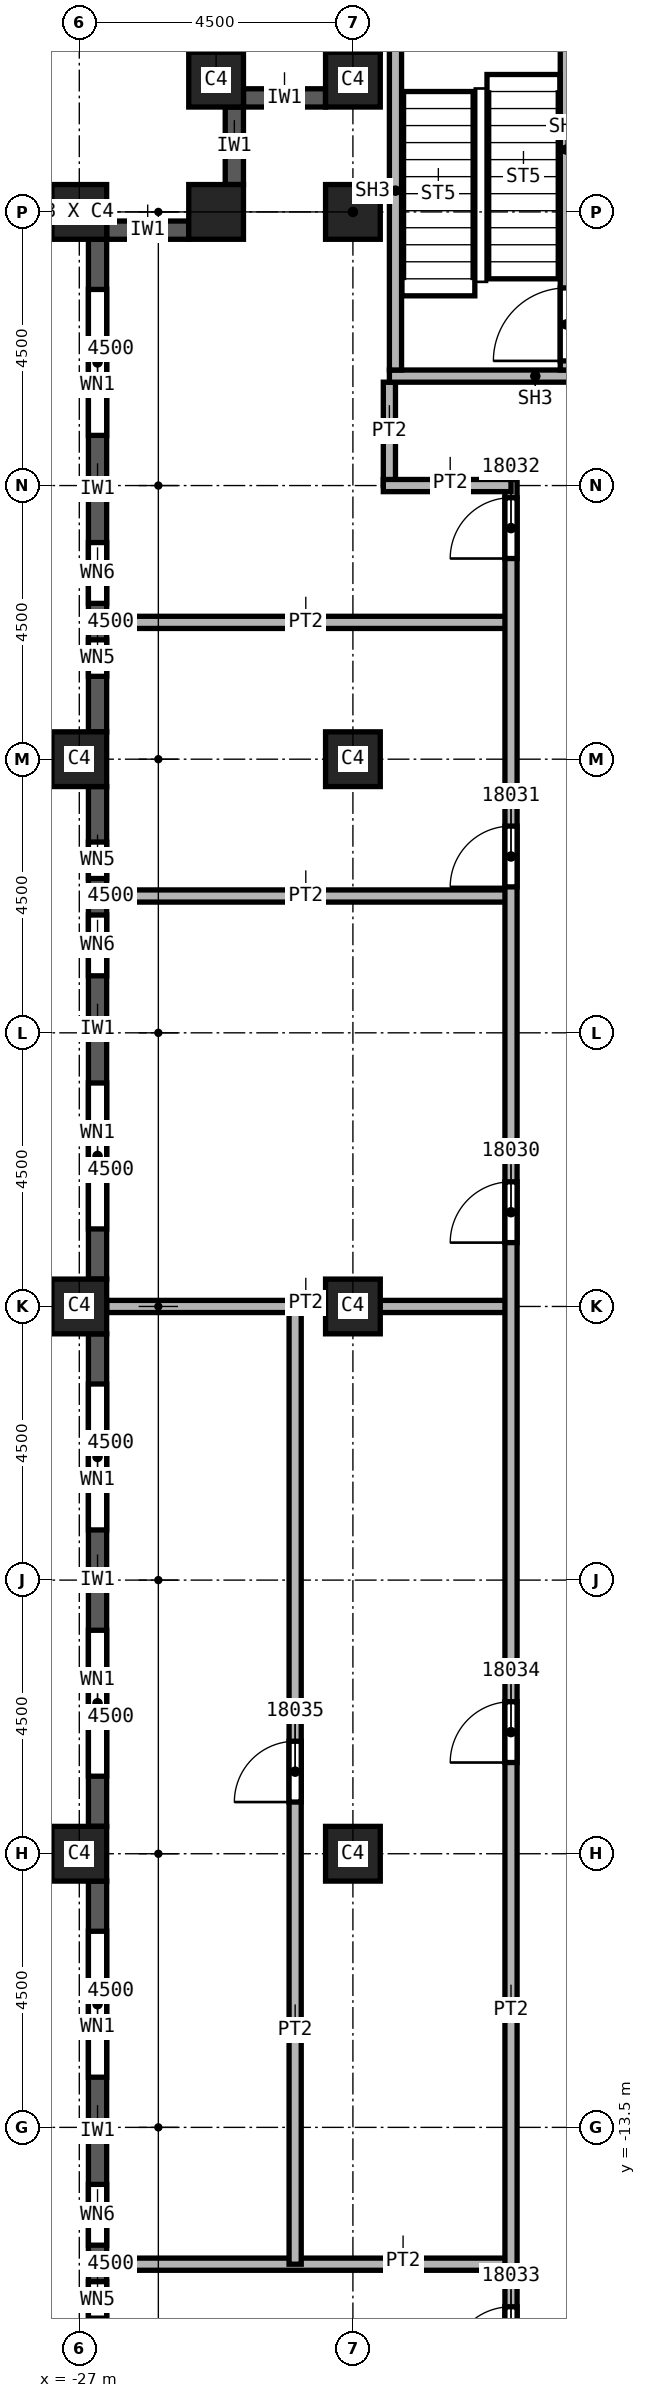
"""IFC4 building model, lengths in metres.
Left out: names, types, materials, properties, quantities, classifications, styles, units other than length and angle.
Written with IfcOpenShell. Run it as: python <this file> out.ifc"""

import sys

from ifc_helpers import new_model, si_unit, direction, frame, frame_2d, origin, origin_2d, place, context, subcontext, project, spatial, rectangle, extrude, element, fill, save


model = new_model("IFC4")
c1 = context("Model", 3, precision=1e-05, world=origin(), true_north=direction((0.0, 1.0)))
c2 = subcontext(c1, "Body", "Model", "MODEL_VIEW")
j1 = project(units=[si_unit("LENGTHUNIT", "METRE"), si_unit("PLANEANGLEUNIT", "RADIAN")], contexts=[c1])
p1 = place(None, origin())
s1 = spatial("IfcSite", under=j1, at=p1, CompositionType="ELEMENT")
p2 = place(p1, origin())
s2 = spatial("IfcBuilding", under=s1, at=p2, CompositionType="ELEMENT")
p3 = place(p2, frame((0.0, 0.0, 266.0)))
s3 = spatial("IfcBuildingStorey", under=s2, at=p3, CompositionType="ELEMENT", Elevation=266.0)
for number, where, z_axis, x_axis in (
    (1, (-22.5, 0.0, 0.0), (0.0, 0.0, 1.0), (1.0, 0.0, 0.0)),
    (2, (-22.5, 9.0, 0.0), (0.0, 0.0, 1.0), (1.0, 0.0, 0.0)),
    (3, (-22.5, 18.0, 0.0), (0.0, 0.0, 1.0), (1.0, 0.0, 0.0)),
    (4, (-22.5, -9.0, 0.0), (0.0, 0.0, 1.0), (1.0, 0.0, 0.0)),
    (5, (-27.0, 0.0, 0.0), (0.0, 0.0, 1.0), (0.0, 1.0, 0.0)),
    (6, (-27.0, 9.0, 0.0), (0.0, 0.0, 1.0), (0.0, 1.0, 0.0)),
    (7, (-27.0, 18.0, 0.0), (0.0, 0.0, 1.0), (0.0, 1.0, 0.0)),
    (8, (-27.0, -9.0, 0.0), (0.0, 0.0, 1.0), (0.0, 1.0, 0.0)),
    (9, (-22.5, 20.175, 0.0), (0.0, 0.0, 1.0), (1.0, 0.0, 0.0)),
    (10, (-24.75, 20.175, 0.0), (0.0, 0.0, 1.0), (1.0, 0.0, 0.0)),
    (11, (-24.75, 18.0, 0.0), (0.0, 0.0, 1.0), (1.0, 0.0, 0.0)),
):
    element("IfcColumn", number, at=place(p3, frame(where, z_axis=z_axis, x_axis=x_axis)), inside=s3, PredefinedType="COLUMN", context=c2, shape_type="SweptSolid", body=[
        extrude(rectangle(XDim=0.9, YDim=0.9, at=origin_2d()), origin(), (0.0, 0.0, 1.0), 3.72),
    ])
p4 = place(p3, frame((-24.45, 19.725, 0.0), z_axis=(0.0, 0.0, 1.0), x_axis=(0.0, -1.0, 0.0)))
e12 = element("IfcWall", 12, at=p4, inside=s3, PredefinedType="SOLIDWALL", context=c2, shape_type="SweptSolid", body=[
    extrude(rectangle(XDim=1.275, YDim=0.3, at=frame_2d((0.638, 0.0))), origin(), (0.0, 0.0, 1.0), 3.12),
])
p5 = place(p3, frame((-25.2, 17.7, 0.0), z_axis=(0.0, 0.0, 1.0), x_axis=(-1.0, 0.0, 0.0)))
e13 = element("IfcWall", 13, at=p5, inside=s3, PredefinedType="SOLIDWALL", context=c2, shape_type="SweptSolid", body=[
    extrude(rectangle(XDim=1.35, YDim=0.3, at=frame_2d((0.675, 0.0))), origin(), (0.0, 0.0, 1.0), 3.12),
])
p6 = place(p3, frame((-26.7, 17.55, 0.0), z_axis=(0.0, 0.0, 1.0), x_axis=(0.0, -1.0, 0.0)))
e14 = element("IfcWall", 14, at=p6, inside=s3, PredefinedType="SOLIDWALL", context=c2, shape_type="SweptSolid", body=[
    extrude(rectangle(XDim=8.1, YDim=0.3, at=frame_2d((4.05, 0.0))), origin(), (0.0, 0.0, 1.0), 3.12),
])
p7 = place(p6, frame((0.825, 0.0, 0.8)))
e15 = element("IfcOpeningElement", 15, at=p7, cuts=e14, PredefinedType="OPENING", context=c2, shape_type="SweptSolid", body=[
    extrude(rectangle(XDim=2.4, YDim=1.95, at=frame_2d((1.2, 0.975))), frame((0.0, 0.15, 0.0), z_axis=(0.0, -1.0, 0.0), x_axis=(1.0, 0.0, 0.0)), (0.0, 0.0, 1.0), 0.3),
])
p8 = place(p6, frame((4.988, 0.0, 0.8)))
e16 = element("IfcOpeningElement", 16, at=p8, cuts=e14, PredefinedType="OPENING", context=c2, shape_type="SweptSolid", body=[
    extrude(rectangle(XDim=1.0, YDim=1.95, at=frame_2d((0.5, 0.975))), frame((0.0, 0.15, 0.0), z_axis=(0.0, -1.0, 0.0), x_axis=(1.0, 0.0, 0.0)), (0.0, 0.0, 1.0), 0.3),
])
p9 = place(p6, frame((6.587, 0.0, 0.8)))
e17 = element("IfcOpeningElement", 17, at=p9, cuts=e14, PredefinedType="OPENING", context=c2, shape_type="SweptSolid", body=[
    extrude(rectangle(XDim=0.6, YDim=1.95, at=frame_2d((0.3, 0.975))), frame((0.0, 0.15, 0.0), z_axis=(0.0, -1.0, 0.0), x_axis=(1.0, 0.0, 0.0)), (0.0, 0.0, 1.0), 0.3),
])
p10 = place(p3, frame((-26.7, 8.55, 0.0), z_axis=(0.0, 0.0, 1.0), x_axis=(0.0, -1.0, 0.0)))
e18 = element("IfcWall", 18, at=p10, inside=s3, PredefinedType="SOLIDWALL", context=c2, shape_type="SweptSolid", body=[
    extrude(rectangle(XDim=8.1, YDim=0.3, at=frame_2d((4.05, 0.0))), origin(), (0.0, 0.0, 1.0), 3.12),
])
p11 = place(p10, frame((4.875, 0.0, 0.8)))
e19 = element("IfcOpeningElement", 19, at=p11, cuts=e18, PredefinedType="OPENING", context=c2, shape_type="SweptSolid", body=[
    extrude(rectangle(XDim=2.4, YDim=1.95, at=frame_2d((1.2, 0.975))), frame((0.0, 0.15, 0.0), z_axis=(0.0, -1.0, 0.0), x_axis=(1.0, 0.0, 0.0)), (0.0, 0.0, 1.0), 0.3),
])
p12 = place(p10, frame((0.913, 0.0, 0.8)))
e20 = element("IfcOpeningElement", 20, at=p12, cuts=e18, PredefinedType="OPENING", context=c2, shape_type="SweptSolid", body=[
    extrude(rectangle(XDim=0.6, YDim=1.95, at=frame_2d((0.3, 0.975))), frame((0.0, 0.15, 0.0), z_axis=(0.0, -1.0, 0.0), x_axis=(1.0, 0.0, 0.0)), (0.0, 0.0, 1.0), 0.3),
])
p13 = place(p10, frame((2.113, 0.0, 0.8)))
e21 = element("IfcOpeningElement", 21, at=p13, cuts=e18, PredefinedType="OPENING", context=c2, shape_type="SweptSolid", body=[
    extrude(rectangle(XDim=1.0, YDim=1.95, at=frame_2d((0.5, 0.975))), frame((0.0, 0.15, 0.0), z_axis=(0.0, -1.0, 0.0), x_axis=(1.0, 0.0, 0.0)), (0.0, 0.0, 1.0), 0.3),
])
p14 = place(p3, frame((-26.7, -0.45, 0.0), z_axis=(0.0, 0.0, 1.0), x_axis=(0.0, -1.0, 0.0)))
e22 = element("IfcWall", 22, at=p14, inside=s3, PredefinedType="SOLIDWALL", context=c2, shape_type="SweptSolid", body=[
    extrude(rectangle(XDim=8.1, YDim=0.3, at=frame_2d((4.05, 0.0))), origin(), (0.0, 0.0, 1.0), 3.12),
])
p15 = place(p14, frame((0.825, 0.0, 0.8)))
e23 = element("IfcOpeningElement", 23, at=p15, cuts=e22, PredefinedType="OPENING", context=c2, shape_type="SweptSolid", body=[
    extrude(rectangle(XDim=2.4, YDim=1.95, at=frame_2d((1.2, 0.975))), frame((0.0, 0.15, 0.0), z_axis=(0.0, -1.0, 0.0), x_axis=(1.0, 0.0, 0.0)), (0.0, 0.0, 1.0), 0.3),
])
p16 = place(p14, frame((4.875, 0.0, 0.8)))
e24 = element("IfcOpeningElement", 24, at=p16, cuts=e22, PredefinedType="OPENING", context=c2, shape_type="SweptSolid", body=[
    extrude(rectangle(XDim=2.4, YDim=1.95, at=frame_2d((1.2, 0.975))), frame((0.0, 0.15, 0.0), z_axis=(0.0, -1.0, 0.0), x_axis=(1.0, 0.0, 0.0)), (0.0, 0.0, 1.0), 0.3),
])
p17 = place(p3, frame((-26.7, -9.45, 0.0), z_axis=(0.0, 0.0, 1.0), x_axis=(0.0, -1.0, 0.0)))
e25 = element("IfcWall", 25, at=p17, inside=s3, PredefinedType="SOLIDWALL", context=c2, shape_type="SweptSolid", body=[
    extrude(rectangle(XDim=8.1, YDim=0.3, at=frame_2d((4.05, 0.0))), origin(), (0.0, 0.0, 1.0), 3.12),
])
p18 = place(p17, frame((0.825, 0.0, 0.8)))
e26 = element("IfcOpeningElement", 26, at=p18, cuts=e25, PredefinedType="OPENING", context=c2, shape_type="SweptSolid", body=[
    extrude(rectangle(XDim=2.4, YDim=1.95, at=frame_2d((1.2, 0.975))), frame((0.0, 0.15, 0.0), z_axis=(0.0, -1.0, 0.0), x_axis=(1.0, 0.0, 0.0)), (0.0, 0.0, 1.0), 0.3),
])
p19 = place(p17, frame((4.988, 0.0, 0.8)))
e27 = element("IfcOpeningElement", 27, at=p19, cuts=e25, PredefinedType="OPENING", context=c2, shape_type="SweptSolid", body=[
    extrude(rectangle(XDim=1.0, YDim=1.95, at=frame_2d((0.5, 0.975))), frame((0.0, 0.15, 0.0), z_axis=(0.0, -1.0, 0.0), x_axis=(1.0, 0.0, 0.0)), (0.0, 0.0, 1.0), 0.3),
])
p20 = place(p17, frame((6.587, 0.0, 0.8)))
e28 = element("IfcOpeningElement", 28, at=p20, cuts=e25, PredefinedType="OPENING", context=c2, shape_type="SweptSolid", body=[
    extrude(rectangle(XDim=0.6, YDim=1.95, at=frame_2d((0.3, 0.975))), frame((0.0, 0.15, 0.0), z_axis=(0.0, -1.0, 0.0), x_axis=(1.0, 0.0, 0.0)), (0.0, 0.0, 1.0), 0.3),
])
p21 = place(p3, frame((-22.95, 19.875, 0.0), z_axis=(0.0, 0.0, 1.0), x_axis=(-1.0, 0.0, 0.0)))
e29 = element("IfcWall", 29, at=p21, inside=s3, PredefinedType="SOLIDWALL", context=c2, shape_type="SweptSolid", body=[
    extrude(rectangle(XDim=1.35, YDim=0.3, at=frame_2d((0.675, 0.0))), origin(), (0.0, 0.0, 1.0), 3.12),
])
for number, where, z_axis, x_axis in (
    (30, (-26.55, -15.75, 0.0), (0.0, 0.0, 1.0), (1.0, 0.0, 0.0)),
    (31, (-26.55, 6.75, 0.0), (0.0, 0.0, 1.0), (1.0, 0.0, 0.0)),
    (32, (-26.55, 11.25, 0.0), (0.0, 0.0, 1.0), (1.0, 0.0, 0.0)),
):
    element("IfcWall", number, at=place(p3, frame(where, z_axis=z_axis, x_axis=x_axis)), inside=s3, PredefinedType="PARTITIONING", context=c2, shape_type="SweptSolid", body=[
        extrude(rectangle(XDim=6.65, YDim=0.2, at=frame_2d((3.325, 0.0))), origin(), (0.0, 0.0, 1.0), 3.72),
    ])
p22 = place(p3, frame((-23.45, -15.75, 0.0), z_axis=(0.0, 0.0, 1.0), x_axis=(0.0, 1.0, 0.0)))
e33 = element("IfcWall", 33, at=p22, inside=s3, PredefinedType="PARTITIONING", context=c2, shape_type="SweptSolid", body=[
    extrude(rectangle(XDim=15.75, YDim=0.2, at=frame_2d((7.875, 0.0))), origin(), (0.0, 0.0, 1.0), 3.72),
])
p23 = place(p22, frame((7.6, 0.0, 0.0)))
e34 = element("IfcOpeningElement", 34, at=p23, cuts=e33, PredefinedType="OPENING", context=c2, shape_type="SweptSolid", body=[
    extrude(rectangle(XDim=1.0, YDim=2.1, at=frame_2d((0.5, 1.05))), frame((0.0, 0.1, 0.0), z_axis=(0.0, -1.0, 0.0), x_axis=(1.0, 0.0, 0.0)), (0.0, 0.0, 1.0), 0.2),
])
p24 = place(p3, frame((-19.9, 0.0, 0.0), z_axis=(0.0, 0.0, 1.0), x_axis=(-1.0, 0.0, 0.0)))
e35 = element("IfcWall", 35, at=p24, inside=s3, PredefinedType="PARTITIONING", context=c2, shape_type="SweptSolid", body=[
    extrude(rectangle(XDim=6.65, YDim=0.2, at=frame_2d((3.325, 0.0))), origin(), (0.0, 0.0, 1.0), 3.72),
])
p25 = place(p3, frame((-21.9, 13.5, 0.0), z_axis=(0.0, 0.0, 1.0), x_axis=(0.0, 1.0, 0.0)))
e36 = element("IfcWall", 36, at=p25, inside=s3, PredefinedType="PARTITIONING", context=c2, shape_type="SweptSolid", body=[
    extrude(rectangle(XDim=1.7, YDim=0.2, at=frame_2d((0.85, 0.0))), origin(), (0.0, 0.0, 1.0), 3.72),
])
p26 = place(p3, frame((-19.9, -21.9, 0.0), z_axis=(0.0, 0.0, 1.0), x_axis=(0.0, 1.0, 0.0)))
e37 = element("IfcWall", 37, at=p26, inside=s3, PredefinedType="PARTITIONING", context=c2, shape_type="SweptSolid", body=[
    extrude(rectangle(XDim=35.5, YDim=0.2, at=frame_2d((17.75, 0.0))), origin(), (0.0, 0.0, 1.0), 3.72),
])
p27 = place(p26, frame((22.95, 0.0, 0.0)))
e38 = element("IfcOpeningElement", 38, at=p27, cuts=e37, PredefinedType="OPENING", context=c2, shape_type="SweptSolid", body=[
    extrude(rectangle(XDim=1.0, YDim=2.1, at=frame_2d((0.5, 1.05))), frame((0.0, 0.1, 0.0), z_axis=(0.0, -1.0, 0.0), x_axis=(1.0, 0.0, 0.0)), (0.0, 0.0, 1.0), 0.2),
])
p28 = place(p26, frame((28.8, 0.0, 0.0)))
e39 = element("IfcOpeningElement", 39, at=p28, cuts=e37, PredefinedType="OPENING", context=c2, shape_type="SweptSolid", body=[
    extrude(rectangle(XDim=1.0, YDim=2.1, at=frame_2d((0.5, 1.05))), frame((0.0, 0.1, 0.0), z_axis=(0.0, -1.0, 0.0), x_axis=(1.0, 0.0, 0.0)), (0.0, 0.0, 1.0), 0.2),
])
p29 = place(p26, frame((34.2, 0.0, 0.0)))
e40 = element("IfcOpeningElement", 40, at=p29, cuts=e37, PredefinedType="OPENING", context=c2, shape_type="SweptSolid", body=[
    extrude(rectangle(XDim=1.0, YDim=2.1, at=frame_2d((0.5, 1.05))), frame((0.0, 0.1, 0.0), z_axis=(0.0, -1.0, 0.0), x_axis=(1.0, 0.0, 0.0)), (0.0, 0.0, 1.0), 0.2),
])
p30 = place(p26, frame((4.45, 0.0, 0.0)))
e41 = element("IfcOpeningElement", 41, at=p30, cuts=e37, PredefinedType="OPENING", context=c2, shape_type="SweptSolid", body=[
    extrude(rectangle(XDim=1.0, YDim=2.1, at=frame_2d((0.5, 1.05))), frame((0.0, 0.1, 0.0), z_axis=(0.0, -1.0, 0.0), x_axis=(1.0, 0.0, 0.0)), (0.0, 0.0, 1.0), 0.2),
])
p31 = place(p26, frame((14.4, 0.0, 0.0)))
e42 = element("IfcOpeningElement", 42, at=p31, cuts=e37, PredefinedType="OPENING", context=c2, shape_type="SweptSolid", body=[
    extrude(rectangle(XDim=1.0, YDim=2.1, at=frame_2d((0.5, 1.05))), frame((0.0, 0.1, 0.0), z_axis=(0.0, -1.0, 0.0), x_axis=(1.0, 0.0, 0.0)), (0.0, 0.0, 1.0), 0.2),
])
p32 = place(p3, frame((-19.9, 13.5, 0.0), z_axis=(0.0, 0.0, 1.0), x_axis=(-1.0, 0.0, 0.0)))
e43 = element("IfcWall", 43, at=p32, inside=s3, PredefinedType="PARTITIONING", context=c2, shape_type="SweptSolid", body=[
    extrude(rectangle(XDim=2.1, YDim=0.2, at=frame_2d((1.05, 0.0))), origin(), (0.0, 0.0, 1.0), 3.72),
])
p33 = place(p3, frame((-21.9, 15.3, 0.0), z_axis=(0.0, 0.0, 1.0), x_axis=(1.0, 0.0, 0.0)))
e44 = element("IfcWall", 44, at=p33, inside=s3, PredefinedType="SOLIDWALL", context=c2, shape_type="SweptSolid", body=[
    extrude(rectangle(XDim=8.275, YDim=0.2, at=frame_2d((4.137, 0.0))), origin(), (0.0, 0.0, 1.0), 3.72),
])
p34 = place(p33, frame((4.8, 0.0, 0.0)))
e45 = element("IfcOpeningElement", 45, at=p34, cuts=e44, PredefinedType="OPENING", context=c2, shape_type="SweptSolid", body=[
    extrude(rectangle(XDim=1.2, YDim=2.1, at=frame_2d((0.6, 1.05))), frame((0.0, 0.1, 0.0), z_axis=(0.0, -1.0, 0.0), x_axis=(1.0, 0.0, 0.0)), (0.0, 0.0, 1.0), 0.2),
])
p35 = place(p3, frame((-21.8, 15.4, 0.0), z_axis=(0.0, 0.0, 1.0), x_axis=(0.0, 1.0, 0.0)))
e46 = element("IfcWall", 46, at=p35, inside=s3, PredefinedType="SOLIDWALL", context=c2, shape_type="SweptSolid", body=[
    extrude(rectangle(XDim=5.9, YDim=0.2, at=frame_2d((2.95, 0.0))), origin(), (0.0, 0.0, 1.0), 3.72),
])
p36 = place(p3, frame((-18.99, 15.4, 0.0), z_axis=(0.0, 0.0, 1.0), x_axis=(0.0, 1.0, 0.0)))
e47 = element("IfcWall", 47, at=p36, inside=s3, PredefinedType="SOLIDWALL", context=c2, shape_type="SweptSolid", body=[
    extrude(rectangle(XDim=5.9, YDim=0.2, at=frame_2d((2.95, 0.0))), origin(), (0.0, 0.0, 1.0), 3.72),
])
p37 = place(p36, frame((0.15, 0.0, 0.0)))
e48 = element("IfcOpeningElement", 48, at=p37, cuts=e47, PredefinedType="OPENING", context=c2, shape_type="SweptSolid", body=[
    extrude(rectangle(XDim=1.2, YDim=2.1, at=frame_2d((0.6, 1.05))), frame((0.0, 0.1, 0.0), z_axis=(0.0, -1.0, 0.0), x_axis=(1.0, 0.0, 0.0)), (0.0, 0.0, 1.0), 0.2),
])
p38 = place(p7, origin())
e49 = element("IfcWindow", 49, at=p38, inside=s3, PartitioningType="SINGLE_PANEL", PredefinedType="WINDOW", context=c2, shape_type="SweptSolid", body=[
    extrude(rectangle(XDim=2.4, YDim=1.95, at=frame_2d((1.2, 0.975))), frame((0.0, 0.03, 0.0), z_axis=(0.0, -1.0, 0.0), x_axis=(1.0, 0.0, 0.0)), (0.0, 0.0, 1.0), 0.06),
])
fill(e15, e49)
p39 = place(p11, origin())
e50 = element("IfcWindow", 50, at=p39, inside=s3, PartitioningType="SINGLE_PANEL", PredefinedType="WINDOW", context=c2, shape_type="SweptSolid", body=[
    extrude(rectangle(XDim=2.4, YDim=1.95, at=frame_2d((1.2, 0.975))), frame((0.0, 0.03, 0.0), z_axis=(0.0, -1.0, 0.0), x_axis=(1.0, 0.0, 0.0)), (0.0, 0.0, 1.0), 0.06),
])
fill(e19, e50)
p40 = place(p15, origin())
e51 = element("IfcWindow", 51, at=p40, inside=s3, PartitioningType="SINGLE_PANEL", PredefinedType="WINDOW", context=c2, shape_type="SweptSolid", body=[
    extrude(rectangle(XDim=2.4, YDim=1.95, at=frame_2d((1.2, 0.975))), frame((0.0, 0.03, 0.0), z_axis=(0.0, -1.0, 0.0), x_axis=(1.0, 0.0, 0.0)), (0.0, 0.0, 1.0), 0.06),
])
fill(e23, e51)
p41 = place(p16, origin())
e52 = element("IfcWindow", 52, at=p41, inside=s3, PartitioningType="SINGLE_PANEL", PredefinedType="WINDOW", context=c2, shape_type="SweptSolid", body=[
    extrude(rectangle(XDim=2.4, YDim=1.95, at=frame_2d((1.2, 0.975))), frame((0.0, 0.03, 0.0), z_axis=(0.0, -1.0, 0.0), x_axis=(1.0, 0.0, 0.0)), (0.0, 0.0, 1.0), 0.06),
])
fill(e24, e52)
p42 = place(p18, origin())
e53 = element("IfcWindow", 53, at=p42, inside=s3, PartitioningType="SINGLE_PANEL", PredefinedType="WINDOW", context=c2, shape_type="SweptSolid", body=[
    extrude(rectangle(XDim=2.4, YDim=1.95, at=frame_2d((1.2, 0.975))), frame((0.0, 0.03, 0.0), z_axis=(0.0, -1.0, 0.0), x_axis=(1.0, 0.0, 0.0)), (0.0, 0.0, 1.0), 0.06),
])
fill(e26, e53)
p43 = place(p27, origin())
e54 = element("IfcDoor", 54, at=p43, inside=s3, OperationType="SINGLE_SWING_LEFT", PredefinedType="DOOR", context=c2, shape_type="SweptSolid", body=[
    extrude(rectangle(XDim=1.0, YDim=2.1, at=frame_2d((0.5, 1.05))), frame((0.0, 0.025, 0.0), z_axis=(0.0, -1.0, 0.0), x_axis=(1.0, 0.0, 0.0)), (0.0, 0.0, 1.0), 0.05),
])
fill(e38, e54)
p44 = place(p28, origin())
e55 = element("IfcDoor", 55, at=p44, inside=s3, OperationType="SINGLE_SWING_RIGHT", PredefinedType="DOOR", context=c2, shape_type="SweptSolid", body=[
    extrude(rectangle(XDim=1.0, YDim=2.1, at=frame_2d((0.5, 1.05))), frame((0.0, 0.025, 0.0), z_axis=(0.0, -1.0, 0.0), x_axis=(1.0, 0.0, 0.0)), (0.0, 0.0, 1.0), 0.05),
])
fill(e39, e55)
p45 = place(p29, origin())
e56 = element("IfcDoor", 56, at=p45, inside=s3, OperationType="SINGLE_SWING_LEFT", PredefinedType="DOOR", context=c2, shape_type="SweptSolid", body=[
    extrude(rectangle(XDim=1.0, YDim=2.1, at=frame_2d((0.5, 1.05))), frame((0.0, 0.025, 0.0), z_axis=(0.0, -1.0, 0.0), x_axis=(1.0, 0.0, 0.0)), (0.0, 0.0, 1.0), 0.05),
])
fill(e40, e56)
p46 = place(p30, origin())
e57 = element("IfcDoor", 57, at=p46, inside=s3, OperationType="SINGLE_SWING_RIGHT", PredefinedType="DOOR", context=c2, shape_type="SweptSolid", body=[
    extrude(rectangle(XDim=1.0, YDim=2.1, at=frame_2d((0.5, 1.05))), frame((0.0, 0.025, 0.0), z_axis=(0.0, -1.0, 0.0), x_axis=(1.0, 0.0, 0.0)), (0.0, 0.0, 1.0), 0.05),
])
fill(e41, e57)
p47 = place(p31, origin())
e58 = element("IfcDoor", 58, at=p47, inside=s3, OperationType="SINGLE_SWING_LEFT", PredefinedType="DOOR", context=c2, shape_type="SweptSolid", body=[
    extrude(rectangle(XDim=1.0, YDim=2.1, at=frame_2d((0.5, 1.05))), frame((0.0, 0.025, 0.0), z_axis=(0.0, -1.0, 0.0), x_axis=(1.0, 0.0, 0.0)), (0.0, 0.0, 1.0), 0.05),
])
fill(e42, e58)
p48 = place(p23, origin())
e59 = element("IfcDoor", 59, at=p48, inside=s3, OperationType="SINGLE_SWING_RIGHT", PredefinedType="DOOR", context=c2, shape_type="SweptSolid", body=[
    extrude(rectangle(XDim=1.0, YDim=2.1, at=frame_2d((0.5, 1.05))), frame((0.0, 0.025, 0.0), z_axis=(0.0, -1.0, 0.0), x_axis=(1.0, 0.0, 0.0)), (0.0, 0.0, 1.0), 0.05),
])
fill(e34, e59)
p49 = place(p37, origin())
e60 = element("IfcDoor", 60, at=p49, inside=s3, OperationType="SINGLE_SWING_LEFT", PredefinedType="DOOR", context=c2, shape_type="SweptSolid", body=[
    extrude(rectangle(XDim=1.2, YDim=2.1, at=frame_2d((0.6, 1.05))), frame((0.0, 0.025, 0.0), z_axis=(0.0, -1.0, 0.0), x_axis=(1.0, 0.0, 0.0)), (0.0, 0.0, 1.0), 0.05),
])
fill(e48, e60)
p50 = place(p8, origin())
e61 = element("IfcWindow", 61, at=p50, inside=s3, PartitioningType="SINGLE_PANEL", PredefinedType="WINDOW", context=c2, shape_type="SweptSolid", body=[
    extrude(rectangle(XDim=1.0, YDim=1.95, at=frame_2d((0.5, 0.975))), frame((0.0, 0.03, 0.0), z_axis=(0.0, -1.0, 0.0), x_axis=(1.0, 0.0, 0.0)), (0.0, 0.0, 1.0), 0.06),
])
fill(e16, e61)
p51 = place(p9, origin())
e62 = element("IfcWindow", 62, at=p51, inside=s3, PartitioningType="SINGLE_PANEL", PredefinedType="WINDOW", context=c2, shape_type="SweptSolid", body=[
    extrude(rectangle(XDim=0.6, YDim=1.95, at=frame_2d((0.3, 0.975))), frame((0.0, 0.03, 0.0), z_axis=(0.0, -1.0, 0.0), x_axis=(1.0, 0.0, 0.0)), (0.0, 0.0, 1.0), 0.06),
])
fill(e17, e62)
p52 = place(p12, origin())
e63 = element("IfcWindow", 63, at=p52, inside=s3, PartitioningType="SINGLE_PANEL", PredefinedType="WINDOW", context=c2, shape_type="SweptSolid", body=[
    extrude(rectangle(XDim=0.6, YDim=1.95, at=frame_2d((0.3, 0.975))), frame((0.0, 0.03, 0.0), z_axis=(0.0, -1.0, 0.0), x_axis=(1.0, 0.0, 0.0)), (0.0, 0.0, 1.0), 0.06),
])
fill(e20, e63)
p53 = place(p13, origin())
e64 = element("IfcWindow", 64, at=p53, inside=s3, PartitioningType="SINGLE_PANEL", PredefinedType="WINDOW", context=c2, shape_type="SweptSolid", body=[
    extrude(rectangle(XDim=1.0, YDim=1.95, at=frame_2d((0.5, 0.975))), frame((0.0, 0.03, 0.0), z_axis=(0.0, -1.0, 0.0), x_axis=(1.0, 0.0, 0.0)), (0.0, 0.0, 1.0), 0.06),
])
fill(e21, e64)
p54 = place(p19, origin())
e65 = element("IfcWindow", 65, at=p54, inside=s3, PartitioningType="SINGLE_PANEL", PredefinedType="WINDOW", context=c2, shape_type="SweptSolid", body=[
    extrude(rectangle(XDim=1.0, YDim=1.95, at=frame_2d((0.5, 0.975))), frame((0.0, 0.03, 0.0), z_axis=(0.0, -1.0, 0.0), x_axis=(1.0, 0.0, 0.0)), (0.0, 0.0, 1.0), 0.06),
])
fill(e27, e65)
p55 = place(p20, origin())
e66 = element("IfcWindow", 66, at=p55, inside=s3, PartitioningType="SINGLE_PANEL", PredefinedType="WINDOW", context=c2, shape_type="SweptSolid", body=[
    extrude(rectangle(XDim=0.6, YDim=1.95, at=frame_2d((0.3, 0.975))), frame((0.0, 0.03, 0.0), z_axis=(0.0, -1.0, 0.0), x_axis=(1.0, 0.0, 0.0)), (0.0, 0.0, 1.0), 0.06),
])
fill(e28, e66)
save(model, sys.argv[1])
